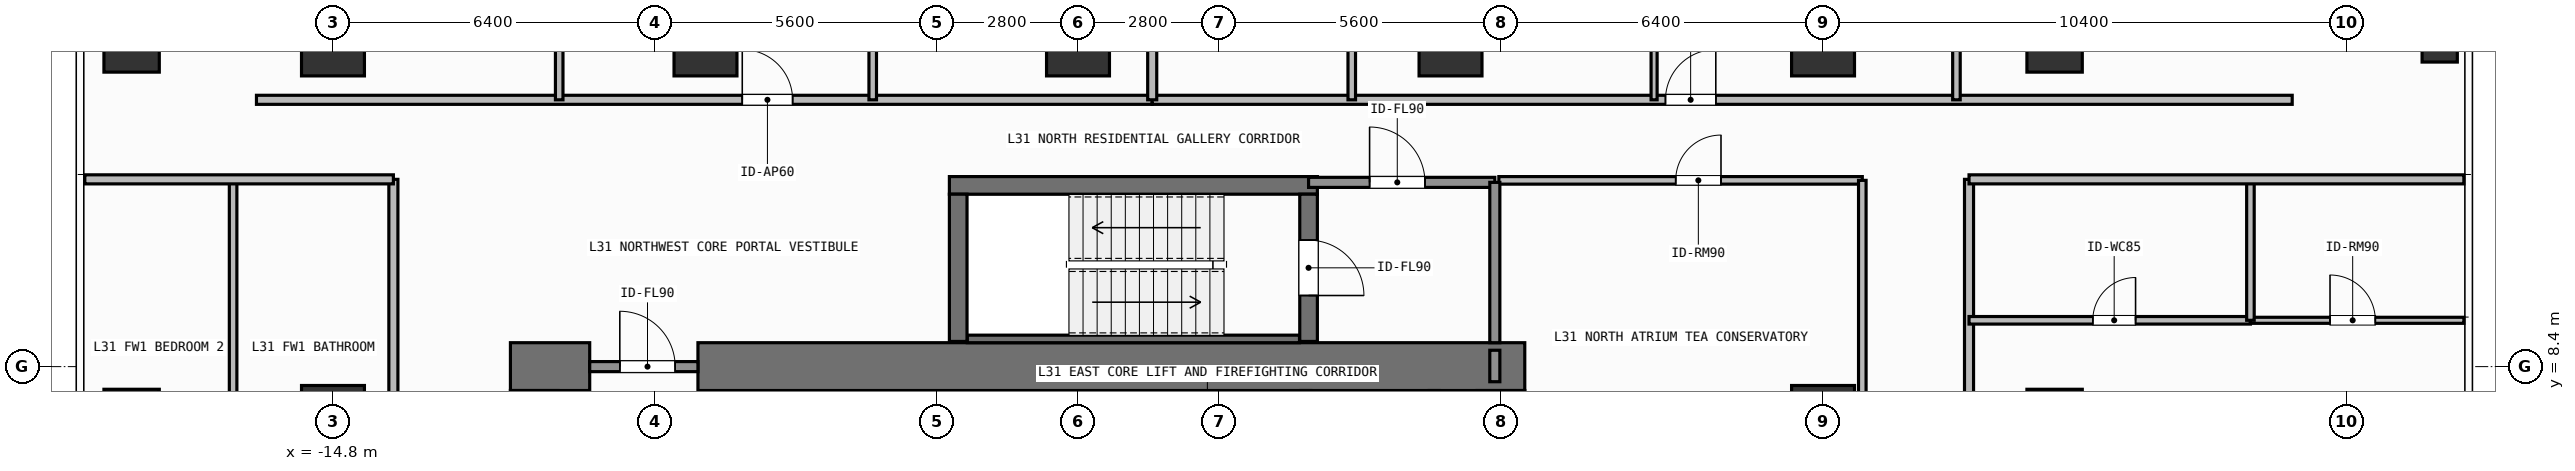
"""IFC4 building model, lengths in metres.
Left out: names, types, materials, properties, quantities, classifications, styles, units other than length and angle.
Written with IfcOpenShell. Run it as: python <this file> out.ifc"""

import sys

from ifc_helpers import new_model, si_unit, direction, frame, frame_2d, origin, origin_2d, place, context, subcontext, project, spatial, rectangle, hollow_rectangle, extrude, element, fill, save


model = new_model("IFC4")
c1 = context("Model", 3, precision=1e-05, world=origin(), true_north=direction((0.0, 1.0)))
c2 = subcontext(c1, "Body", "Model", "MODEL_VIEW")
j1 = project(units=[si_unit("LENGTHUNIT", "METRE"), si_unit("PLANEANGLEUNIT", "RADIAN")], contexts=[c1])
p1 = place(None, origin())
s1 = spatial("IfcSite", under=j1, at=p1, CompositionType="ELEMENT")
p2 = place(p1, origin())
s2 = spatial("IfcBuilding", under=s1, at=p2, CompositionType="ELEMENT")
p3 = place(p2, frame((0.0, 0.0, 125.1)))
s3 = spatial("IfcBuildingStorey", under=s2, at=p3, CompositionType="ELEMENT", Elevation=125.1)
p4 = place(p3, frame((-11.275, 8.4, 0.0), z_axis=(0.0, 0.0, 1.0), x_axis=(1.0, 0.0, 0.0)))
e1 = element("IfcWall", 1, at=p4, inside=s3, PredefinedType="SHEAR", context=c2, shape_type="SweptSolid", body=[
    extrude(rectangle(XDim=1.575, YDim=0.95, at=frame_2d((0.788, 0.0))), origin(), (0.0, 0.0, 1.0), 3.9),
])
p5 = place(p3, frame((-7.55, 8.4, 0.0), z_axis=(0.0, 0.0, 1.0), x_axis=(1.0, 0.0, 0.0)))
e2 = element("IfcWall", 2, at=p5, inside=s3, PredefinedType="SHEAR", context=c2, shape_type="SweptSolid", body=[
    extrude(rectangle(XDim=16.425, YDim=0.95, at=frame_2d((8.212, 0.0))), origin(), (0.0, 0.0, 1.0), 3.9),
])
p6 = place(p3, frame((-10.8, -7.925, 0.0), z_axis=(0.0, 0.0, 1.0), x_axis=(0.0, 1.0, 0.0)))
e3 = element("IfcWall", 3, at=p6, inside=s3, PredefinedType="SHEAR", context=c2, shape_type="SweptSolid", body=[
    extrude(rectangle(XDim=15.85, YDim=0.95, at=frame_2d((7.925, 0.0))), origin(), (0.0, 0.0, 1.0), 3.9),
])
p7 = place(p3, frame((8.4, 5.825, 0.0), z_axis=(0.0, 0.0, 1.0), x_axis=(0.0, 1.0, 0.0)))
e4 = element("IfcWall", 4, at=p7, inside=s3, PredefinedType="SHEAR", context=c2, shape_type="SweptSolid", body=[
    extrude(rectangle(XDim=2.1, YDim=0.95, at=frame_2d((1.05, 0.0))), origin(), (0.0, 0.0, 1.0), 3.9),
])
p8 = place(p3, frame((-2.555, 12.0, 0.0), z_axis=(0.0, 0.0, 1.0), x_axis=(1.0, 0.0, 0.0)))
e5 = element("IfcWall", 5, at=p8, inside=s3, PredefinedType="SHEAR", context=c2, shape_type="SweptSolid", body=[
    extrude(rectangle(XDim=7.31, YDim=0.35, at=frame_2d((3.655, 0.0))), origin(), (0.0, 0.0, 1.0), 3.9),
])
p9 = place(p3, frame((-2.2, 8.95, 0.0), z_axis=(0.0, 0.0, 1.0), x_axis=(1.0, 0.0, 0.0)))
e6 = element("IfcWall", 6, at=p9, inside=s3, PredefinedType="SHEAR", context=c2, shape_type="SweptSolid", body=[
    extrude(rectangle(XDim=6.6, YDim=0.15, at=frame_2d((3.3, 0.0))), origin(), (0.0, 0.0, 1.0), 3.9),
])
p10 = place(p3, frame((-2.38, 8.9, 0.0), z_axis=(0.0, 0.0, 1.0), x_axis=(0.0, 1.0, 0.0)))
e7 = element("IfcWall", 7, at=p10, inside=s3, PredefinedType="SHEAR", context=c2, shape_type="SweptSolid", body=[
    extrude(rectangle(XDim=2.925, YDim=0.35, at=frame_2d((1.462, 0.0))), origin(), (0.0, 0.0, 1.0), 3.9),
])
p11 = place(p3, frame((4.58, 11.825, 0.0), z_axis=(0.0, 0.0, 1.0), x_axis=(0.0, -1.0, 0.0)))
e8 = element("IfcWall", 8, at=p11, inside=s3, PredefinedType="SHEAR", context=c2, shape_type="SweptSolid", body=[
    extrude(rectangle(XDim=2.925, YDim=0.35, at=frame_2d((1.462, 0.0))), origin(), (0.0, 0.0, 1.0), 3.9),
])
p12 = place(p11, frame((0.913, 0.0, 0.0)))
e9 = element("IfcOpeningElement", 9, at=p12, cuts=e8, PredefinedType="OPENING", context=c2, shape_type="SweptSolid", body=[
    extrude(rectangle(XDim=1.1, YDim=2.15, at=frame_2d((0.55, 1.075))), frame((0.0, 0.185, 0.0), z_axis=(0.0, -1.0, 0.0), x_axis=(1.0, 0.0, 0.0)), (0.0, 0.0, 1.0), 0.37),
])
for number, where, z_axis, x_axis in (
    (10, (-14.8, 14.8, 0.0), (0.0, 0.0, 1.0), (1.0, 0.0, 0.0)),
    (11, (-7.4, 14.8, 0.0), (0.0, 0.0, 1.0), (1.0, 0.0, 0.0)),
    (12, (0.0, 14.8, 0.0), (0.0, 0.0, 1.0), (1.0, 0.0, 0.0)),
    (13, (7.4, 14.8, 0.0), (0.0, 0.0, 1.0), (1.0, 0.0, 0.0)),
    (14, (14.8, 14.8, 0.0), (0.0, 0.0, 1.0), (1.0, 0.0, 0.0)),
    (15, (-14.8, 7.4, 0.0), (0.0, 0.0, 1.0), (1.0, 0.0, 0.0)),
    (16, (14.8, 7.4, 0.0), (0.0, 0.0, 1.0), (1.0, 0.0, 0.0)),
):
    element("IfcColumn", number, at=place(p3, frame(where, z_axis=z_axis, x_axis=x_axis)), inside=s3, PredefinedType="COLUMN", context=c2, shape_type="SweptSolid", body=[
        extrude(rectangle(XDim=1.25, YDim=1.25, at=origin_2d()), origin(), (0.0, 0.0, 1.0), 3.9),
    ])
for number, where, z_axis, x_axis in (
    (17, (-18.8, 7.4, 0.0), (0.0, 0.0, 1.0), (1.0, 0.0, 0.0)),
    (18, (-18.8, 14.8, 0.0), (0.0, 0.0, 1.0), (1.0, 0.0, 0.0)),
    (19, (19.4, 7.4, 0.0), (0.0, 0.0, 1.0), (1.0, 0.0, 0.0)),
    (20, (19.4, 14.8, 0.0), (0.0, 0.0, 1.0), (1.0, 0.0, 0.0)),
):
    element("IfcColumn", number, at=place(p3, frame(where, z_axis=z_axis, x_axis=x_axis)), inside=s3, PredefinedType="COLUMN", context=c2, shape_type="SweptSolid", body=[
        extrude(rectangle(XDim=1.1, YDim=1.1, at=origin_2d()), origin(), (0.0, 0.0, 1.0), 3.9),
    ])
p13 = place(p3, frame((27.05, 14.8, 0.0), z_axis=(0.0, 0.0, 1.0), x_axis=(1.0, 0.0, 0.0)))
e21 = element("IfcColumn", 21, at=p13, inside=s3, PredefinedType="COLUMN", context=c2, shape_type="SweptSolid", body=[
    extrude(hollow_rectangle(XDim=0.7, YDim=0.7, WallThickness=0.032, at=origin_2d()), origin(), (0.0, 0.0, 1.0), 3.9),
])
p14 = place(p3, frame((4.525, 5.825, 0.0), z_axis=(0.0, 0.0, 1.0), x_axis=(0.0, 1.0, 0.0)))
e22 = element("IfcWall", 22, at=p14, inside=s3, PredefinedType="SHEAR", context=c2, shape_type="SweptSolid", body=[
    extrude(rectangle(XDim=2.1, YDim=0.2, at=frame_2d((1.05, 0.0))), origin(), (0.0, 0.0, 1.0), 3.68),
])
p15 = place(p14, frame((0.425, 0.0, 0.0)))
e23 = element("IfcOpeningElement", 23, at=p15, cuts=e22, PredefinedType="OPENING", context=c2, shape_type="SweptSolid", body=[
    extrude(rectangle(XDim=1.1, YDim=2.2, at=frame_2d((0.55, 1.1))), frame((0.0, 0.11, 0.0), z_axis=(0.0, -1.0, 0.0), x_axis=(1.0, 0.0, 0.0)), (0.0, 0.0, 1.0), 0.22),
])
p16 = place(p3, frame((7.075, 5.825, 0.0), z_axis=(0.0, 0.0, 1.0), x_axis=(0.0, 1.0, 0.0)))
e24 = element("IfcWall", 24, at=p16, inside=s3, PredefinedType="SHEAR", context=c2, shape_type="SweptSolid", body=[
    extrude(rectangle(XDim=2.1, YDim=0.2, at=frame_2d((1.05, 0.0))), origin(), (0.0, 0.0, 1.0), 3.68),
])
p17 = place(p3, frame((4.58, 12.06, 0.0), z_axis=(0.0, 0.0, 1.0), x_axis=(1.0, 0.0, 0.0)))
e25 = element("IfcWall", 25, at=p17, inside=s3, PredefinedType="SOLIDWALL", context=c2, shape_type="SweptSolid", body=[
    extrude(rectangle(XDim=3.7, YDim=0.2, at=frame_2d((1.85, 0.0))), origin(), (0.0, 0.0, 1.0), 3.68),
])
p18 = place(p17, frame((1.212, 0.0, 0.0)))
e26 = element("IfcOpeningElement", 26, at=p18, cuts=e25, PredefinedType="OPENING", context=c2, shape_type="SweptSolid", body=[
    extrude(rectangle(XDim=1.1, YDim=2.15, at=frame_2d((0.55, 1.075))), frame((0.0, 0.11, 0.0), z_axis=(0.0, -1.0, 0.0), x_axis=(1.0, 0.0, 0.0)), (0.0, 0.0, 1.0), 0.22),
])
p19 = place(p3, frame((-9.7, 8.4, 0.0), z_axis=(0.0, 0.0, 1.0), x_axis=(1.0, 0.0, 0.0)))
e27 = element("IfcWall", 27, at=p19, inside=s3, PredefinedType="SOLIDWALL", context=c2, shape_type="SweptSolid", body=[
    extrude(rectangle(XDim=2.15, YDim=0.2, at=frame_2d((1.075, 0.0))), origin(), (0.0, 0.0, 1.0), 2.72),
])
p20 = place(p19, frame((0.598, 0.0, 0.0)))
e28 = element("IfcOpeningElement", 28, at=p20, cuts=e27, PredefinedType="OPENING", context=c2, shape_type="SweptSolid", body=[
    extrude(rectangle(XDim=1.1, YDim=2.15, at=frame_2d((0.55, 1.075))), frame((0.0, 0.11, 0.0), z_axis=(0.0, -1.0, 0.0), x_axis=(1.0, 0.0, 0.0)), (0.0, 0.0, 1.0), 0.22),
])
p21 = place(p3, frame((8.36, 12.1, 0.0), z_axis=(0.0, 0.0, 1.0), x_axis=(1.0, 0.0, 0.0)))
e29 = element("IfcWall", 29, at=p21, inside=s3, PredefinedType="PARTITIONING", context=c2, shape_type="SweptSolid", body=[
    extrude(rectangle(XDim=7.22, YDim=0.15, at=frame_2d((3.61, 0.0))), origin(), (0.0, 0.0, 1.0), 3.68),
])
p22 = place(p21, frame((3.513, 0.0, 0.0)))
e30 = element("IfcOpeningElement", 30, at=p22, cuts=e29, PredefinedType="OPENING", context=c2, shape_type="SweptSolid", body=[
    extrude(rectangle(XDim=0.9, YDim=2.1, at=frame_2d((0.45, 1.05))), frame((0.0, 0.085, 0.0), z_axis=(0.0, -1.0, 0.0), x_axis=(1.0, 0.0, 0.0)), (0.0, 0.0, 1.0), 0.17),
])
p23 = place(p3, frame((-16.32, 13.7, 0.0), z_axis=(0.0, 0.0, 1.0), x_axis=(1.0, 0.0, 0.0)))
e31 = element("IfcWall", 31, at=p23, inside=s3, PredefinedType="PARTITIONING", context=c2, shape_type="SweptSolid", body=[
    extrude(rectangle(XDim=17.794, YDim=0.18, at=frame_2d((8.897, 0.0))), origin(), (0.0, 0.0, 1.0), 3.68),
])
p24 = place(p23, frame((9.65, 0.0, 0.0)))
e32 = element("IfcOpeningElement", 32, at=p24, cuts=e31, PredefinedType="OPENING", context=c2, shape_type="SweptSolid", body=[
    extrude(rectangle(XDim=1.0, YDim=2.2, at=frame_2d((0.5, 1.1))), frame((0.0, 0.1, 0.0), z_axis=(0.0, -1.0, 0.0), x_axis=(1.0, 0.0, 0.0)), (0.0, 0.0, 1.0), 0.2),
])
p25 = place(p3, frame((-10.306, 13.7, 0.0), z_axis=(0.0, 0.0, 1.0), x_axis=(0.0, 1.0, 0.0)))
e33 = element("IfcWall", 33, at=p25, inside=s3, PredefinedType="PARTITIONING", context=c2, shape_type="SweptSolid", body=[
    extrude(rectangle(XDim=5.653, YDim=0.15, at=frame_2d((2.827, 0.0))), origin(), (0.0, 0.0, 1.0), 3.68),
])
p26 = place(p25, frame((2.312, 0.0, 0.0)))
e34 = element("IfcOpeningElement", 34, at=p26, cuts=e33, PredefinedType="OPENING", context=c2, shape_type="SweptSolid", body=[
    extrude(rectangle(XDim=0.85, YDim=2.1, at=frame_2d((0.425, 1.05))), frame((0.0, 0.085, 0.0), z_axis=(0.0, -1.0, 0.0), x_axis=(1.0, 0.0, 0.0)), (0.0, 0.0, 1.0), 0.17),
])
p27 = place(p3, frame((-4.078, 13.7, 0.0), z_axis=(0.0, 0.0, 1.0), x_axis=(0.0, 1.0, 0.0)))
e35 = element("IfcWall", 35, at=p27, inside=s3, PredefinedType="PARTITIONING", context=c2, shape_type="SweptSolid", body=[
    extrude(rectangle(XDim=3.102, YDim=0.15, at=frame_2d((1.551, 0.0))), origin(), (0.0, 0.0, 1.0), 3.68),
])
p28 = place(p27, frame((1.214, 0.0, 0.0)))
e36 = element("IfcOpeningElement", 36, at=p28, cuts=e35, PredefinedType="OPENING", context=c2, shape_type="SweptSolid", body=[
    extrude(rectangle(XDim=0.85, YDim=2.1, at=frame_2d((0.425, 1.05))), frame((0.0, 0.085, 0.0), z_axis=(0.0, -1.0, 0.0), x_axis=(1.0, 0.0, 0.0)), (0.0, 0.0, 1.0), 0.17),
])
p29 = place(p3, frame((1.474, 13.7, 0.0), z_axis=(0.0, 0.0, 1.0), x_axis=(1.0, 0.0, 0.0)))
e37 = element("IfcWall", 37, at=p29, inside=s3, PredefinedType="PARTITIONING", context=c2, shape_type="SweptSolid", body=[
    extrude(rectangle(XDim=22.646, YDim=0.18, at=frame_2d((11.323, 0.0))), origin(), (0.0, 0.0, 1.0), 3.68),
])
p30 = place(p29, frame((10.196, 0.0, 0.0)))
e38 = element("IfcOpeningElement", 38, at=p30, cuts=e37, PredefinedType="OPENING", context=c2, shape_type="SweptSolid", body=[
    extrude(rectangle(XDim=1.0, YDim=2.2, at=frame_2d((0.5, 1.1))), frame((0.0, 0.1, 0.0), z_axis=(0.0, -1.0, 0.0), x_axis=(1.0, 0.0, 0.0)), (0.0, 0.0, 1.0), 0.2),
])
p31 = place(p3, frame((11.444, 13.7, 0.0), z_axis=(0.0, 0.0, 1.0), x_axis=(0.0, 1.0, 0.0)))
e39 = element("IfcWall", 39, at=p31, inside=s3, PredefinedType="PARTITIONING", context=c2, shape_type="SweptSolid", body=[
    extrude(rectangle(XDim=11.49, YDim=0.12, at=frame_2d((5.745, 0.0))), origin(), (0.0, 0.0, 1.0), 3.68),
])
p32 = place(p31, frame((5.295, 0.0, 0.0)))
e40 = element("IfcOpeningElement", 40, at=p32, cuts=e39, PredefinedType="OPENING", context=c2, shape_type="SweptSolid", body=[
    extrude(rectangle(XDim=0.9, YDim=2.1, at=frame_2d((0.45, 1.05))), frame((0.0, 0.07, 0.0), z_axis=(0.0, -1.0, 0.0), x_axis=(1.0, 0.0, 0.0)), (0.0, 0.0, 1.0), 0.14),
])
p33 = place(p3, frame((5.438, 13.7, 0.0), z_axis=(0.0, 0.0, 1.0), x_axis=(0.0, 1.0, 0.0)))
e41 = element("IfcWall", 41, at=p33, inside=s3, PredefinedType="PARTITIONING", context=c2, shape_type="SweptSolid", body=[
    extrude(rectangle(XDim=6.664, YDim=0.15, at=frame_2d((3.332, 0.0))), origin(), (0.0, 0.0, 1.0), 3.68),
])
p34 = place(p33, frame((2.818, 0.0, 0.0)))
e42 = element("IfcOpeningElement", 42, at=p34, cuts=e41, PredefinedType="OPENING", context=c2, shape_type="SweptSolid", body=[
    extrude(rectangle(XDim=0.85, YDim=2.1, at=frame_2d((0.425, 1.05))), frame((0.0, 0.085, 0.0), z_axis=(0.0, -1.0, 0.0), x_axis=(1.0, 0.0, 0.0)), (0.0, 0.0, 1.0), 0.17),
])
p35 = place(p3, frame((17.45, 13.7, 0.0), z_axis=(0.0, 0.0, 1.0), x_axis=(0.0, 1.0, 0.0)))
e43 = element("IfcWall", 43, at=p35, inside=s3, PredefinedType="PARTITIONING", context=c2, shape_type="SweptSolid", body=[
    extrude(rectangle(XDim=3.102, YDim=0.15, at=frame_2d((1.551, 0.0))), origin(), (0.0, 0.0, 1.0), 3.68),
])
p36 = place(p35, frame((1.741, 0.0, 0.0)))
e44 = element("IfcOpeningElement", 44, at=p36, cuts=e43, PredefinedType="OPENING", context=c2, shape_type="SweptSolid", body=[
    extrude(rectangle(XDim=0.85, YDim=2.1, at=frame_2d((0.425, 1.05))), frame((0.0, 0.085, 0.0), z_axis=(0.0, -1.0, 0.0), x_axis=(1.0, 0.0, 0.0)), (0.0, 0.0, 1.0), 0.17),
])
p37 = place(p3, frame((-13.6, -12.12, 0.0), z_axis=(0.0, 0.0, 1.0), x_axis=(0.0, 1.0, 0.0)))
e45 = element("IfcWall", 45, at=p37, inside=s3, PredefinedType="PARTITIONING", context=c2, shape_type="SweptSolid", body=[
    extrude(rectangle(XDim=24.24, YDim=0.18, at=frame_2d((12.12, 0.0))), origin(), (0.0, 0.0, 1.0), 3.68),
])
p38 = place(p37, frame((11.62, 0.0, 0.0)))
e46 = element("IfcOpeningElement", 46, at=p38, cuts=e45, PredefinedType="OPENING", context=c2, shape_type="SweptSolid", body=[
    extrude(rectangle(XDim=1.0, YDim=2.2, at=frame_2d((0.5, 1.1))), frame((0.0, 0.1, 0.0), z_axis=(0.0, -1.0, 0.0), x_axis=(1.0, 0.0, 0.0)), (0.0, 0.0, 1.0), 0.2),
])
p39 = place(p3, frame((17.7, 1.309, 0.0), z_axis=(0.0, 0.0, 1.0), x_axis=(0.0, 1.0, 0.0)))
e47 = element("IfcWall", 47, at=p39, inside=s3, PredefinedType="PARTITIONING", context=c2, shape_type="SweptSolid", body=[
    extrude(rectangle(XDim=10.811, YDim=0.18, at=frame_2d((5.406, 0.0))), origin(), (0.0, 0.0, 1.0), 3.68),
])
p40 = place(p39, frame((4.458, 0.0, 0.0)))
e48 = element("IfcOpeningElement", 48, at=p40, cuts=e47, PredefinedType="OPENING", context=c2, shape_type="SweptSolid", body=[
    extrude(rectangle(XDim=1.0, YDim=2.2, at=frame_2d((0.5, 1.1))), frame((0.0, 0.1, 0.0), z_axis=(0.0, -1.0, 0.0), x_axis=(1.0, 0.0, 0.0)), (0.0, 0.0, 1.0), 0.2),
])
p41 = place(p3, frame((17.7, 9.32, 0.0), z_axis=(0.0, 0.0, 1.0), x_axis=(1.0, 0.0, 0.0)))
e49 = element("IfcWall", 49, at=p41, inside=s3, PredefinedType="PARTITIONING", context=c2, shape_type="SweptSolid", body=[
    extrude(rectangle(XDim=5.59, YDim=0.15, at=frame_2d((2.795, 0.0))), origin(), (0.0, 0.0, 1.0), 3.68),
])
p42 = place(p41, frame((2.458, 0.0, 0.0)))
e50 = element("IfcOpeningElement", 50, at=p42, cuts=e49, PredefinedType="OPENING", context=c2, shape_type="SweptSolid", body=[
    extrude(rectangle(XDim=0.85, YDim=2.1, at=frame_2d((0.425, 1.05))), frame((0.0, 0.085, 0.0), z_axis=(0.0, -1.0, 0.0), x_axis=(1.0, 0.0, 0.0)), (0.0, 0.0, 1.0), 0.17),
])
p43 = place(p3, frame((23.29, 9.32, 0.0), z_axis=(0.0, 0.0, 1.0), x_axis=(1.0, 0.0, 0.0)))
e51 = element("IfcWall", 51, at=p43, inside=s3, PredefinedType="PARTITIONING", context=c2, shape_type="SweptSolid", body=[
    extrude(rectangle(XDim=4.24, YDim=0.12, at=frame_2d((2.12, 0.0))), origin(), (0.0, 0.0, 1.0), 3.68),
])
p44 = place(p43, frame((1.581, 0.0, 0.0)))
e52 = element("IfcOpeningElement", 52, at=p44, cuts=e51, PredefinedType="OPENING", context=c2, shape_type="SweptSolid", body=[
    extrude(rectangle(XDim=0.9, YDim=2.1, at=frame_2d((0.45, 1.05))), frame((0.0, 0.07, 0.0), z_axis=(0.0, -1.0, 0.0), x_axis=(1.0, 0.0, 0.0)), (0.0, 0.0, 1.0), 0.14),
])
p45 = place(p3, frame((8.28, 8.875, 0.0), z_axis=(0.0, 0.0, 1.0), x_axis=(0.0, 1.0, 0.0)))
e53 = element("IfcWall", 53, at=p45, inside=s3, PredefinedType="SOLIDWALL", context=c2, shape_type="SweptSolid", body=[
    extrude(rectangle(XDim=3.185, YDim=0.2, at=frame_2d((1.593, 0.0))), origin(), (0.0, 0.0, 1.0), 3.68),
])
p46 = place(p3, frame((8.28, 8.1, 0.0), z_axis=(0.0, 0.0, 1.0), x_axis=(0.0, 1.0, 0.0)))
e54 = element("IfcWall", 54, at=p46, inside=s3, PredefinedType="SOLIDWALL", context=c2, shape_type="SweptSolid", body=[
    extrude(rectangle(XDim=0.625, YDim=0.2, at=frame_2d((0.312, 0.0))), origin(), (0.0, 0.0, 1.0), 3.68),
])
p47 = place(p3, frame((15.58, 5.85, 0.0), z_axis=(0.0, 0.0, 1.0), x_axis=(0.0, 1.0, 0.0)))
e55 = element("IfcWall", 55, at=p47, inside=s3, PredefinedType="PARTITIONING", context=c2, shape_type="SweptSolid", body=[
    extrude(rectangle(XDim=6.25, YDim=0.15, at=frame_2d((3.125, 0.0))), origin(), (0.0, 0.0, 1.0), 3.68),
])
p48 = place(p3, frame((1.474, 13.7, 0.0), z_axis=(0.0, 0.0, 1.0), x_axis=(0.0, 1.0, 0.0)))
e56 = element("IfcWall", 56, at=p48, inside=s3, PredefinedType="PARTITIONING", context=c2, shape_type="SweptSolid", body=[
    extrude(rectangle(XDim=15.73, YDim=0.18, at=frame_2d((7.865, 0.0))), origin(), (0.0, 0.0, 1.0), 3.68),
])
p49 = place(p3, frame((-16.784, 5.449, 0.0), z_axis=(0.0, 0.0, 1.0), x_axis=(0.0, 1.0, 0.0)))
e57 = element("IfcWall", 57, at=p49, inside=s3, PredefinedType="PARTITIONING", context=c2, shape_type="SweptSolid", body=[
    extrude(rectangle(XDim=6.671, YDim=0.15, at=frame_2d((3.335, 0.0))), origin(), (0.0, 0.0, 1.0), 3.68),
])
p50 = place(p3, frame((-19.73, 12.12, 0.0), z_axis=(0.0, 0.0, 1.0), x_axis=(1.0, 0.0, 0.0)))
e58 = element("IfcWall", 58, at=p50, inside=s3, PredefinedType="PARTITIONING", context=c2, shape_type="SweptSolid", body=[
    extrude(rectangle(XDim=6.13, YDim=0.18, at=frame_2d((3.065, 0.0))), origin(), (0.0, 0.0, 1.0), 3.68),
])
p51 = place(p3, frame((23.29, 9.32, 0.0), z_axis=(0.0, 0.0, 1.0), x_axis=(0.0, 1.0, 0.0)))
e59 = element("IfcWall", 59, at=p51, inside=s3, PredefinedType="PARTITIONING", context=c2, shape_type="SweptSolid", body=[
    extrude(rectangle(XDim=2.8, YDim=0.15, at=frame_2d((1.4, 0.0))), origin(), (0.0, 0.0, 1.0), 3.68),
])
p52 = place(p3, frame((17.7, 12.12, 0.0), z_axis=(0.0, 0.0, 1.0), x_axis=(1.0, 0.0, 0.0)))
e60 = element("IfcWall", 60, at=p52, inside=s3, PredefinedType="PARTITIONING", context=c2, shape_type="SweptSolid", body=[
    extrude(rectangle(XDim=9.83, YDim=0.18, at=frame_2d((4.915, 0.0))), origin(), (0.0, 0.0, 1.0), 3.68),
])
p53 = place(p12, origin())
e61 = element("IfcDoor", 61, at=p53, inside=s3, OperationType="SINGLE_SWING_RIGHT", PredefinedType="DOOR", context=c2, shape_type="SweptSolid", body=[
    extrude(rectangle(XDim=1.1, YDim=2.15, at=frame_2d((0.55, 1.075))), frame((0.0, 0.025, 0.0), z_axis=(0.0, -1.0, 0.0), x_axis=(1.0, 0.0, 0.0)), (0.0, 0.0, 1.0), 0.05),
])
fill(e9, e61)
p54 = place(p18, origin())
e62 = element("IfcDoor", 62, at=p54, inside=s3, OperationType="SINGLE_SWING_LEFT", PredefinedType="DOOR", context=c2, shape_type="SweptSolid", body=[
    extrude(rectangle(XDim=1.1, YDim=2.15, at=frame_2d((0.55, 1.075))), frame((0.0, 0.025, 0.0), z_axis=(0.0, -1.0, 0.0), x_axis=(1.0, 0.0, 0.0)), (0.0, 0.0, 1.0), 0.05),
])
fill(e26, e62)
p55 = place(p20, origin())
e63 = element("IfcDoor", 63, at=p55, inside=s3, OperationType="SINGLE_SWING_LEFT", PredefinedType="DOOR", context=c2, shape_type="SweptSolid", body=[
    extrude(rectangle(XDim=1.1, YDim=2.15, at=frame_2d((0.55, 1.075))), frame((0.0, 0.025, 0.0), z_axis=(0.0, -1.0, 0.0), x_axis=(1.0, 0.0, 0.0)), (0.0, 0.0, 1.0), 0.05),
])
fill(e28, e63)
p56 = place(p22, origin())
e64 = element("IfcDoor", 64, at=p56, inside=s3, OperationType="SINGLE_SWING_RIGHT", PredefinedType="DOOR", context=c2, shape_type="SweptSolid", body=[
    extrude(rectangle(XDim=0.9, YDim=2.1, at=frame_2d((0.45, 1.05))), frame((0.0, 0.025, 0.0), z_axis=(0.0, -1.0, 0.0), x_axis=(1.0, 0.0, 0.0)), (0.0, 0.0, 1.0), 0.05),
])
fill(e30, e64)
p57 = place(p24, origin())
e65 = element("IfcDoor", 65, at=p57, inside=s3, OperationType="SINGLE_SWING_LEFT", PredefinedType="DOOR", context=c2, shape_type="SweptSolid", body=[
    extrude(rectangle(XDim=1.0, YDim=2.2, at=frame_2d((0.5, 1.1))), frame((0.0, 0.025, 0.0), z_axis=(0.0, -1.0, 0.0), x_axis=(1.0, 0.0, 0.0)), (0.0, 0.0, 1.0), 0.05),
])
fill(e32, e65)
p58 = place(p30, origin())
e66 = element("IfcDoor", 66, at=p58, inside=s3, OperationType="SINGLE_SWING_RIGHT", PredefinedType="DOOR", context=c2, shape_type="SweptSolid", body=[
    extrude(rectangle(XDim=1.0, YDim=2.2, at=frame_2d((0.5, 1.1))), frame((0.0, 0.025, 0.0), z_axis=(0.0, -1.0, 0.0), x_axis=(1.0, 0.0, 0.0)), (0.0, 0.0, 1.0), 0.05),
])
fill(e38, e66)
p59 = place(p42, origin())
e67 = element("IfcDoor", 67, at=p59, inside=s3, OperationType="SINGLE_SWING_RIGHT", PredefinedType="DOOR", context=c2, shape_type="SweptSolid", body=[
    extrude(rectangle(XDim=0.85, YDim=2.1, at=frame_2d((0.425, 1.05))), frame((0.0, 0.025, 0.0), z_axis=(0.0, -1.0, 0.0), x_axis=(1.0, 0.0, 0.0)), (0.0, 0.0, 1.0), 0.05),
])
fill(e50, e67)
p60 = place(p44, origin())
e68 = element("IfcDoor", 68, at=p60, inside=s3, OperationType="SINGLE_SWING_LEFT", PredefinedType="DOOR", context=c2, shape_type="SweptSolid", body=[
    extrude(rectangle(XDim=0.9, YDim=2.1, at=frame_2d((0.45, 1.05))), frame((0.0, 0.025, 0.0), z_axis=(0.0, -1.0, 0.0), x_axis=(1.0, 0.0, 0.0)), (0.0, 0.0, 1.0), 0.05),
])
fill(e52, e68)
save(model, sys.argv[1])
